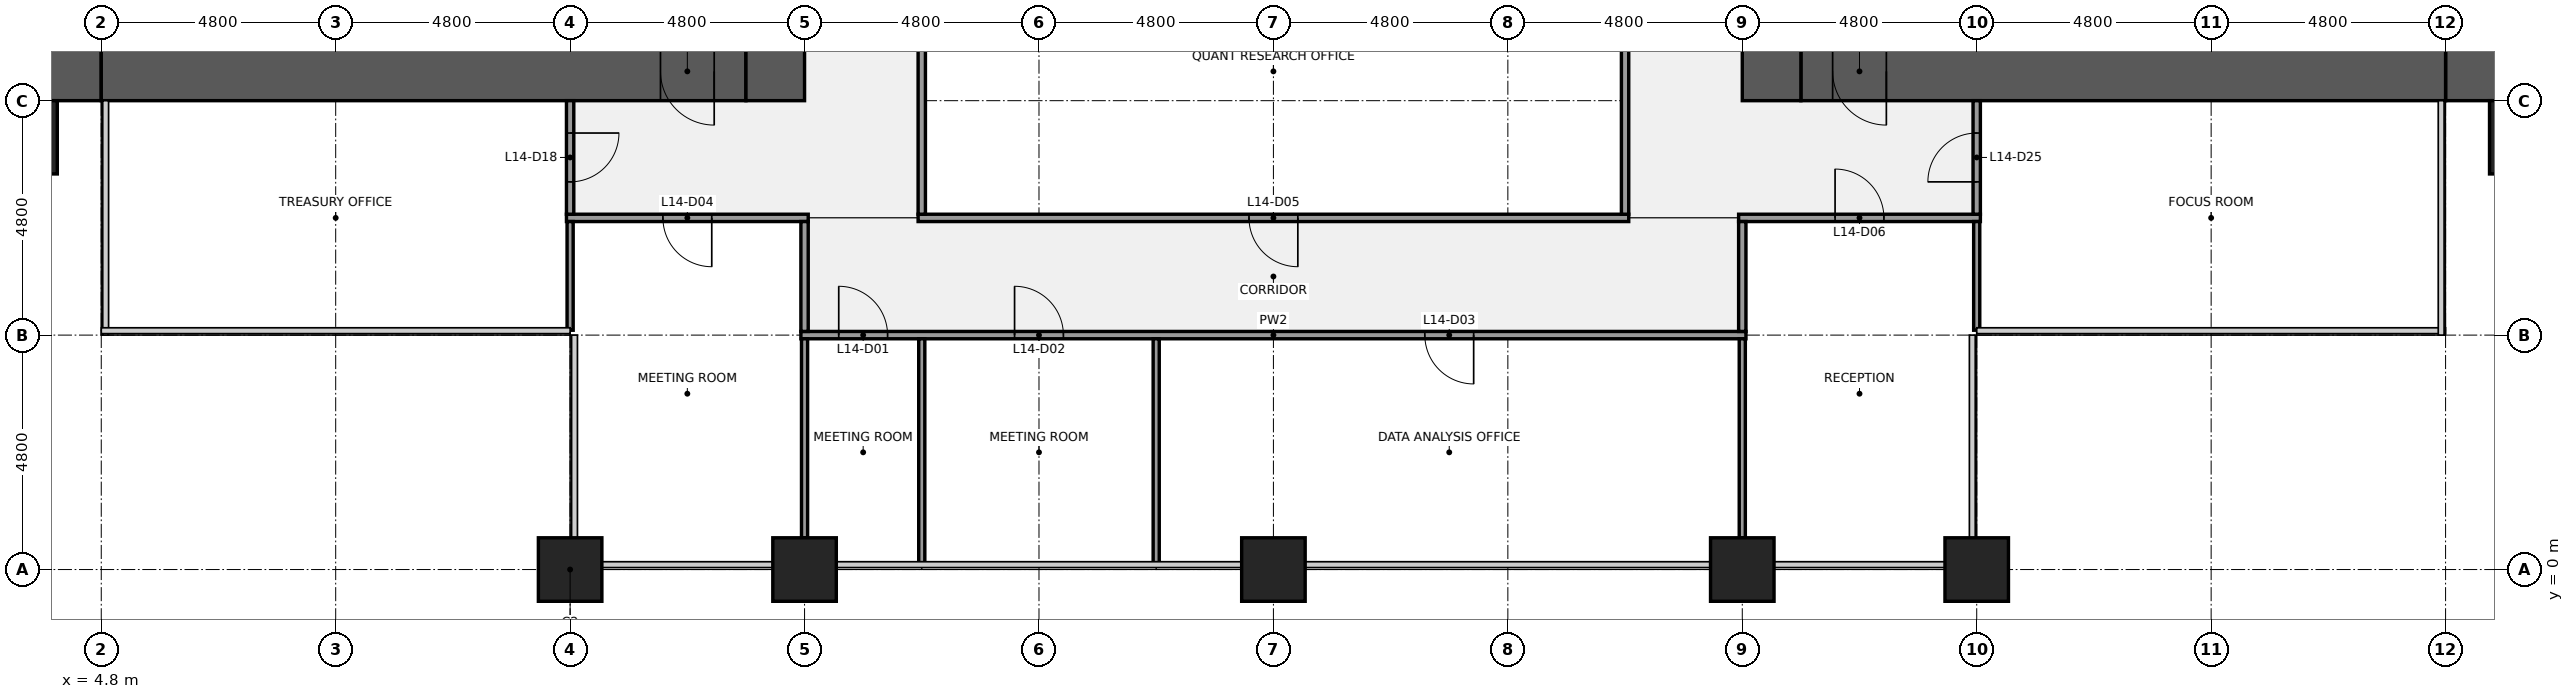
"""IFC4 building model, lengths in metres.
Left out: names, types, materials, properties, quantities, classifications, styles, units other than length and angle.
Written with IfcOpenShell. Run it as: python <this file> out.ifc"""

import sys

from ifc_helpers import new_model, si_unit, direction, frame, frame_2d, origin, origin_2d, place, context, subcontext, project, spatial, rectangle, extrude, element, fill, save


model = new_model("IFC4")
c1 = context("Model", 3, precision=1e-05, world=origin(), true_north=direction((0.0, 1.0)))
c2 = subcontext(c1, "Body", "Model", "MODEL_VIEW")
j1 = project(units=[si_unit("LENGTHUNIT", "METRE"), si_unit("PLANEANGLEUNIT", "RADIAN")], contexts=[c1])
p1 = place(None, origin())
s1 = spatial("IfcSite", under=j1, at=p1, CompositionType="ELEMENT")
p2 = place(p1, origin())
s2 = spatial("IfcBuilding", under=s1, at=p2, CompositionType="ELEMENT")
p3 = place(p2, frame((0.0, 0.0, 67.0)))
s3 = spatial("IfcBuildingStorey", under=s2, at=p3, CompositionType="ELEMENT", Elevation=67.0)
for number, where, z_axis, x_axis in (
    (1, (14.4, 0.0, 0.0), (0.0, 0.0, 1.0), (1.0, 0.0, 0.0)),
    (2, (19.2, 0.0, 0.0), (0.0, 0.0, 1.0), (1.0, 0.0, 0.0)),
    (3, (28.8, 0.0, 0.0), (0.0, 0.0, 1.0), (1.0, 0.0, 0.0)),
    (4, (38.4, 0.0, 0.0), (0.0, 0.0, 1.0), (1.0, 0.0, 0.0)),
    (5, (43.2, 0.0, 0.0), (0.0, 0.0, 1.0), (1.0, 0.0, 0.0)),
):
    element("IfcColumn", number, at=place(p3, frame(where, z_axis=z_axis, x_axis=x_axis)), inside=s3, PredefinedType="COLUMN", context=c2, shape_type="SweptSolid", body=[
        extrude(rectangle(XDim=1.3, YDim=1.3, at=origin_2d()), origin(), (0.0, 0.0, 1.0), 4.0),
    ])
p4 = place(p3, frame((4.8, 10.2, 0.0), z_axis=(0.0, 0.0, 1.0), x_axis=(-1.0, 0.0, 0.0)))
e6 = element("IfcWall", 6, at=p4, inside=s3, PredefinedType="SHEAR", context=c2, shape_type="SweptSolid", body=[
    extrude(rectangle(XDim=3.6, YDim=1.2, at=frame_2d((1.8, 0.0))), origin(), (0.0, 0.0, 1.0), 3.84),
])
p5 = place(p3, frame((18.0, 10.2, 0.0), z_axis=(0.0, 0.0, 1.0), x_axis=(-1.0, 0.0, 0.0)))
e7 = element("IfcWall", 7, at=p5, inside=s3, PredefinedType="SHEAR", context=c2, shape_type="SweptSolid", body=[
    extrude(rectangle(XDim=13.2, YDim=1.2, at=frame_2d((6.6, 0.0))), origin(), (0.0, 0.0, 1.0), 3.84),
])
p6 = place(p5, frame((0.65, 0.0, 0.0)))
e8 = element("IfcOpeningElement", 8, at=p6, cuts=e7, PredefinedType="OPENING", context=c2, shape_type="SweptSolid", body=[
    extrude(rectangle(XDim=1.1, YDim=2.1, at=frame_2d((0.55, 1.05))), frame((0.0, 0.61, 0.0), z_axis=(0.0, -1.0, 0.0), x_axis=(1.0, 0.0, 0.0)), (0.0, 0.0, 1.0), 1.22),
])
p7 = place(p3, frame((18.6, 38.4, 0.0), z_axis=(0.0, 0.0, 1.0), x_axis=(0.0, -1.0, 0.0)))
e9 = element("IfcWall", 9, at=p7, inside=s3, PredefinedType="SHEAR", context=c2, shape_type="SweptSolid", body=[
    extrude(rectangle(XDim=28.8, YDim=1.2, at=frame_2d((14.4, 0.0))), origin(), (0.0, 0.0, 1.0), 3.84),
])
p8 = place(p7, frame((18.3, 0.0, 0.0)))
e10 = element("IfcOpeningElement", 10, at=p8, cuts=e9, PredefinedType="OPENING", context=c2, shape_type="SweptSolid", body=[
    extrude(rectangle(XDim=1.8, YDim=2.1, at=frame_2d((0.9, 1.05))), frame((0.0, 0.61, 0.0), z_axis=(0.0, -1.0, 0.0), x_axis=(1.0, 0.0, 0.0)), (0.0, 0.0, 1.0), 1.22),
])
p9 = place(p7, frame((8.7, 0.0, 0.0)))
e11 = element("IfcOpeningElement", 11, at=p9, cuts=e9, PredefinedType="OPENING", context=c2, shape_type="SweptSolid", body=[
    extrude(rectangle(XDim=1.8, YDim=2.1, at=frame_2d((0.9, 1.05))), frame((0.0, 0.61, 0.0), z_axis=(0.0, -1.0, 0.0), x_axis=(1.0, 0.0, 0.0)), (0.0, 0.0, 1.0), 1.22),
])
p10 = place(p3, frame((56.4, 10.2, 0.0), z_axis=(0.0, 0.0, 1.0), x_axis=(-1.0, 0.0, 0.0)))
e12 = element("IfcWall", 12, at=p10, inside=s3, PredefinedType="SHEAR", context=c2, shape_type="SweptSolid", body=[
    extrude(rectangle(XDim=3.6, YDim=1.2, at=frame_2d((1.8, 0.0))), origin(), (0.0, 0.0, 1.0), 3.84),
])
p11 = place(p3, frame((52.8, 10.2, 0.0), z_axis=(0.0, 0.0, 1.0), x_axis=(-1.0, 0.0, 0.0)))
e13 = element("IfcWall", 13, at=p11, inside=s3, PredefinedType="SHEAR", context=c2, shape_type="SweptSolid", body=[
    extrude(rectangle(XDim=13.2, YDim=1.2, at=frame_2d((6.6, 0.0))), origin(), (0.0, 0.0, 1.0), 3.84),
])
p12 = place(p11, frame((11.45, 0.0, 0.0)))
e14 = element("IfcOpeningElement", 14, at=p12, cuts=e13, PredefinedType="OPENING", context=c2, shape_type="SweptSolid", body=[
    extrude(rectangle(XDim=1.1, YDim=2.1, at=frame_2d((0.55, 1.05))), frame((0.0, 0.61, 0.0), z_axis=(0.0, -1.0, 0.0), x_axis=(1.0, 0.0, 0.0)), (0.0, 0.0, 1.0), 1.22),
])
p13 = place(p3, frame((39.0, 9.6, 0.0), z_axis=(0.0, 0.0, 1.0), x_axis=(0.0, 1.0, 0.0)))
e15 = element("IfcWall", 15, at=p13, inside=s3, PredefinedType="SHEAR", context=c2, shape_type="SweptSolid", body=[
    extrude(rectangle(XDim=28.8, YDim=1.2, at=frame_2d((14.4, 0.0))), origin(), (0.0, 0.0, 1.0), 3.84),
])
p14 = place(p13, frame((8.7, 0.0, 0.0)))
e16 = element("IfcOpeningElement", 16, at=p14, cuts=e15, PredefinedType="OPENING", context=c2, shape_type="SweptSolid", body=[
    extrude(rectangle(XDim=1.8, YDim=2.1, at=frame_2d((0.9, 1.05))), frame((0.0, 0.61, 0.0), z_axis=(0.0, -1.0, 0.0), x_axis=(1.0, 0.0, 0.0)), (0.0, 0.0, 1.0), 1.22),
])
p15 = place(p13, frame((18.3, 0.0, 0.0)))
e17 = element("IfcOpeningElement", 17, at=p15, cuts=e15, PredefinedType="OPENING", context=c2, shape_type="SweptSolid", body=[
    extrude(rectangle(XDim=1.8, YDim=2.1, at=frame_2d((0.9, 1.05))), frame((0.0, 0.61, 0.0), z_axis=(0.0, -1.0, 0.0), x_axis=(1.0, 0.0, 0.0)), (0.0, 0.0, 1.0), 1.22),
])
p16 = place(p3, frame((19.125, 4.8, 0.0), z_axis=(0.0, 0.0, 1.0), x_axis=(1.0, 0.0, 0.0)))
e18 = element("IfcWall", 18, at=p16, inside=s3, PredefinedType="PARTITIONING", context=c2, shape_type="SweptSolid", body=[
    extrude(rectangle(XDim=19.35, YDim=0.15, at=frame_2d((9.675, 0.0))), origin(), (0.0, 0.0, 1.0), 2.849),
])
p17 = place(p16, frame((0.775, 0.0, 0.0)))
e19 = element("IfcOpeningElement", 19, at=p17, cuts=e18, PredefinedType="OPENING", context=c2, shape_type="SweptSolid", body=[
    extrude(rectangle(XDim=1.0, YDim=2.1, at=frame_2d((0.5, 1.05))), frame((0.0, 0.085, 0.0), z_axis=(0.0, -1.0, 0.0), x_axis=(1.0, 0.0, 0.0)), (0.0, 0.0, 1.0), 0.17),
])
p18 = place(p16, frame((4.375, 0.0, 0.0)))
e20 = element("IfcOpeningElement", 20, at=p18, cuts=e18, PredefinedType="OPENING", context=c2, shape_type="SweptSolid", body=[
    extrude(rectangle(XDim=1.0, YDim=2.1, at=frame_2d((0.5, 1.05))), frame((0.0, 0.085, 0.0), z_axis=(0.0, -1.0, 0.0), x_axis=(1.0, 0.0, 0.0)), (0.0, 0.0, 1.0), 0.17),
])
p19 = place(p16, frame((12.775, 0.0, 0.0)))
e21 = element("IfcOpeningElement", 21, at=p19, cuts=e18, PredefinedType="OPENING", context=c2, shape_type="SweptSolid", body=[
    extrude(rectangle(XDim=1.0, YDim=2.1, at=frame_2d((0.5, 1.05))), frame((0.0, 0.085, 0.0), z_axis=(0.0, -1.0, 0.0), x_axis=(1.0, 0.0, 0.0)), (0.0, 0.0, 1.0), 0.17),
])
p20 = place(p3, frame((14.325, 7.2, 0.0), z_axis=(0.0, 0.0, 1.0), x_axis=(1.0, 0.0, 0.0)))
e22 = element("IfcWall", 22, at=p20, inside=s3, PredefinedType="PARTITIONING", context=c2, shape_type="SweptSolid", body=[
    extrude(rectangle(XDim=4.95, YDim=0.15, at=frame_2d((2.475, 0.0))), origin(), (0.0, 0.0, 1.0), 2.849),
])
p21 = place(p20, frame((1.975, 0.0, 0.0)))
e23 = element("IfcOpeningElement", 23, at=p21, cuts=e22, PredefinedType="OPENING", context=c2, shape_type="SweptSolid", body=[
    extrude(rectangle(XDim=1.0, YDim=2.1, at=frame_2d((0.5, 1.05))), frame((0.0, 0.085, 0.0), z_axis=(0.0, -1.0, 0.0), x_axis=(1.0, 0.0, 0.0)), (0.0, 0.0, 1.0), 0.17),
])
p22 = place(p3, frame((21.525, 7.2, 0.0), z_axis=(0.0, 0.0, 1.0), x_axis=(1.0, 0.0, 0.0)))
e24 = element("IfcWall", 24, at=p22, inside=s3, PredefinedType="PARTITIONING", context=c2, shape_type="SweptSolid", body=[
    extrude(rectangle(XDim=14.55, YDim=0.15, at=frame_2d((7.275, 0.0))), origin(), (0.0, 0.0, 1.0), 2.849),
])
p23 = place(p22, frame((6.775, 0.0, 0.0)))
e25 = element("IfcOpeningElement", 25, at=p23, cuts=e24, PredefinedType="OPENING", context=c2, shape_type="SweptSolid", body=[
    extrude(rectangle(XDim=1.0, YDim=2.1, at=frame_2d((0.5, 1.05))), frame((0.0, 0.085, 0.0), z_axis=(0.0, -1.0, 0.0), x_axis=(1.0, 0.0, 0.0)), (0.0, 0.0, 1.0), 0.17),
])
p24 = place(p3, frame((38.325, 7.2, 0.0), z_axis=(0.0, 0.0, 1.0), x_axis=(1.0, 0.0, 0.0)))
e26 = element("IfcWall", 26, at=p24, inside=s3, PredefinedType="PARTITIONING", context=c2, shape_type="SweptSolid", body=[
    extrude(rectangle(XDim=4.95, YDim=0.15, at=frame_2d((2.475, 0.0))), origin(), (0.0, 0.0, 1.0), 2.849),
])
p25 = place(p24, frame((1.975, 0.0, 0.0)))
e27 = element("IfcOpeningElement", 27, at=p25, cuts=e26, PredefinedType="OPENING", context=c2, shape_type="SweptSolid", body=[
    extrude(rectangle(XDim=1.0, YDim=2.1, at=frame_2d((0.5, 1.05))), frame((0.0, 0.085, 0.0), z_axis=(0.0, -1.0, 0.0), x_axis=(1.0, 0.0, 0.0)), (0.0, 0.0, 1.0), 0.17),
])
p26 = place(p3, frame((14.4, 4.9, 0.0), z_axis=(0.0, 0.0, 1.0), x_axis=(0.0, 1.0, 0.0)))
e28 = element("IfcWall", 28, at=p26, inside=s3, PredefinedType="PARTITIONING", context=c2, shape_type="SweptSolid", body=[
    extrude(rectangle(XDim=2.225, YDim=0.125, at=frame_2d((1.113, 0.0))), origin(), (0.0, 0.0, 1.0), 2.849),
])
p27 = place(p3, frame((14.4, 7.275, 0.0), z_axis=(0.0, 0.0, 1.0), x_axis=(0.0, 1.0, 0.0)))
e29 = element("IfcWall", 29, at=p27, inside=s3, PredefinedType="PARTITIONING", context=c2, shape_type="SweptSolid", body=[
    extrude(rectangle(XDim=2.325, YDim=0.15, at=frame_2d((1.163, 0.0))), origin(), (0.0, 0.0, 1.0), 2.849),
])
p28 = place(p27, frame((0.663, 0.0, 0.0)))
e30 = element("IfcOpeningElement", 30, at=p28, cuts=e29, PredefinedType="OPENING", context=c2, shape_type="SweptSolid", body=[
    extrude(rectangle(XDim=1.0, YDim=2.1, at=frame_2d((0.5, 1.05))), frame((0.0, 0.085, 0.0), z_axis=(0.0, -1.0, 0.0), x_axis=(1.0, 0.0, 0.0)), (0.0, 0.0, 1.0), 0.17),
])
p29 = place(p3, frame((19.2, 0.65, 0.0), z_axis=(0.0, 0.0, 1.0), x_axis=(0.0, 1.0, 0.0)))
e31 = element("IfcWall", 31, at=p29, inside=s3, PredefinedType="PARTITIONING", context=c2, shape_type="SweptSolid", body=[
    extrude(rectangle(XDim=4.075, YDim=0.125, at=frame_2d((2.038, 0.0))), origin(), (0.0, 0.0, 1.0), 2.849),
])
p30 = place(p3, frame((19.2, 4.875, 0.0), z_axis=(0.0, 0.0, 1.0), x_axis=(0.0, 1.0, 0.0)))
e32 = element("IfcWall", 32, at=p30, inside=s3, PredefinedType="PARTITIONING", context=c2, shape_type="SweptSolid", body=[
    extrude(rectangle(XDim=2.25, YDim=0.15, at=frame_2d((1.125, 0.0))), origin(), (0.0, 0.0, 1.0), 2.849),
])
p31 = place(p3, frame((21.6, 0.1, 0.0), z_axis=(0.0, 0.0, 1.0), x_axis=(0.0, 1.0, 0.0)))
e33 = element("IfcWall", 33, at=p31, inside=s3, PredefinedType="PARTITIONING", context=c2, shape_type="SweptSolid", body=[
    extrude(rectangle(XDim=4.625, YDim=0.125, at=frame_2d((2.312, 0.0))), origin(), (0.0, 0.0, 1.0), 2.849),
])
p32 = place(p3, frame((21.6, 7.275, 0.0), z_axis=(0.0, 0.0, 1.0), x_axis=(0.0, 1.0, 0.0)))
e34 = element("IfcWall", 34, at=p32, inside=s3, PredefinedType="PARTITIONING", context=c2, shape_type="SweptSolid", body=[
    extrude(rectangle(XDim=5.863, YDim=0.15, at=frame_2d((2.931, 0.0))), origin(), (0.0, 0.0, 1.0), 2.849),
])
p33 = place(p3, frame((26.4, 0.1, 0.0), z_axis=(0.0, 0.0, 1.0), x_axis=(0.0, 1.0, 0.0)))
e35 = element("IfcWall", 35, at=p33, inside=s3, PredefinedType="PARTITIONING", context=c2, shape_type="SweptSolid", body=[
    extrude(rectangle(XDim=4.625, YDim=0.125, at=frame_2d((2.312, 0.0))), origin(), (0.0, 0.0, 1.0), 2.849),
])
p34 = place(p3, frame((36.0, 7.275, 0.0), z_axis=(0.0, 0.0, 1.0), x_axis=(0.0, 1.0, 0.0)))
e36 = element("IfcWall", 36, at=p34, inside=s3, PredefinedType="PARTITIONING", context=c2, shape_type="SweptSolid", body=[
    extrude(rectangle(XDim=5.863, YDim=0.15, at=frame_2d((2.931, 0.0))), origin(), (0.0, 0.0, 1.0), 2.849),
])
p35 = place(p3, frame((38.4, 0.65, 0.0), z_axis=(0.0, 0.0, 1.0), x_axis=(0.0, 1.0, 0.0)))
e37 = element("IfcWall", 37, at=p35, inside=s3, PredefinedType="PARTITIONING", context=c2, shape_type="SweptSolid", body=[
    extrude(rectangle(XDim=4.075, YDim=0.125, at=frame_2d((2.038, 0.0))), origin(), (0.0, 0.0, 1.0), 2.849),
])
p36 = place(p3, frame((38.4, 4.875, 0.0), z_axis=(0.0, 0.0, 1.0), x_axis=(0.0, 1.0, 0.0)))
e38 = element("IfcWall", 38, at=p36, inside=s3, PredefinedType="PARTITIONING", context=c2, shape_type="SweptSolid", body=[
    extrude(rectangle(XDim=2.25, YDim=0.15, at=frame_2d((1.125, 0.0))), origin(), (0.0, 0.0, 1.0), 2.849),
])
p37 = place(p3, frame((43.2, 4.9, 0.0), z_axis=(0.0, 0.0, 1.0), x_axis=(0.0, 1.0, 0.0)))
e39 = element("IfcWall", 39, at=p37, inside=s3, PredefinedType="PARTITIONING", context=c2, shape_type="SweptSolid", body=[
    extrude(rectangle(XDim=2.225, YDim=0.125, at=frame_2d((1.113, 0.0))), origin(), (0.0, 0.0, 1.0), 2.849),
])
p38 = place(p3, frame((43.2, 7.275, 0.0), z_axis=(0.0, 0.0, 1.0), x_axis=(0.0, 1.0, 0.0)))
e40 = element("IfcWall", 40, at=p38, inside=s3, PredefinedType="PARTITIONING", context=c2, shape_type="SweptSolid", body=[
    extrude(rectangle(XDim=2.325, YDim=0.15, at=frame_2d((1.163, 0.0))), origin(), (0.0, 0.0, 1.0), 2.849),
])
p39 = place(p38, frame((0.663, 0.0, 0.0)))
e41 = element("IfcOpeningElement", 41, at=p39, cuts=e40, PredefinedType="OPENING", context=c2, shape_type="SweptSolid", body=[
    extrude(rectangle(XDim=1.0, YDim=2.1, at=frame_2d((0.5, 1.05))), frame((0.0, 0.085, 0.0), z_axis=(0.0, -1.0, 0.0), x_axis=(1.0, 0.0, 0.0)), (0.0, 0.0, 1.0), 0.17),
])
for number, where, z_axis, x_axis in (
    (42, (55.2, 8.85, 0.0), (0.0, 0.0, 1.0), (1.0, 0.0, 0.0)),
    (43, (2.4, 8.85, 0.0), (0.0, 0.0, 1.0), (1.0, 0.0, 0.0)),
):
    element("IfcColumn", number, at=place(p3, frame(where, z_axis=z_axis, x_axis=x_axis)), inside=s3, PredefinedType="PILASTER", context=c2, shape_type="SweptSolid", body=[
        extrude(rectangle(XDim=3.0, YDim=1.5, at=origin_2d()), origin(), (0.0, 0.0, 1.0), 4.0),
    ])
for number, where, z_axis, x_axis in (
    (44, (14.4, -1.075, 0.0), (0.0, 0.0, 1.0), (1.0, 0.0, 0.0)),
    (45, (19.2, -1.075, 0.0), (0.0, 0.0, 1.0), (1.0, 0.0, 0.0)),
    (46, (38.4, -1.075, 0.0), (0.0, 0.0, 1.0), (1.0, 0.0, 0.0)),
    (47, (43.2, -1.075, 0.0), (0.0, 0.0, 1.0), (1.0, 0.0, 0.0)),
):
    element("IfcColumn", number, at=place(p3, frame(where, z_axis=z_axis, x_axis=x_axis)), inside=s3, PredefinedType="PILASTER", context=c2, shape_type="SweptSolid", body=[
        extrude(rectangle(XDim=4.2, YDim=0.85, at=origin_2d()), origin(), (0.0, 0.0, 1.0), 4.0),
    ])
p40 = place(p6, origin())
e48 = element("IfcDoor", 48, at=p40, inside=s3, OperationType="SINGLE_SWING_LEFT", PredefinedType="DOOR", context=c2, shape_type="SweptSolid", body=[
    extrude(rectangle(XDim=1.1, YDim=2.1, at=frame_2d((0.55, 1.05))), frame((0.0, 0.025, 0.0), z_axis=(0.0, -1.0, 0.0), x_axis=(1.0, 0.0, 0.0)), (0.0, 0.0, 1.0), 0.05),
])
fill(e8, e48)
p41 = place(p12, origin())
e49 = element("IfcDoor", 49, at=p41, inside=s3, OperationType="SINGLE_SWING_LEFT", PredefinedType="DOOR", context=c2, shape_type="SweptSolid", body=[
    extrude(rectangle(XDim=1.1, YDim=2.1, at=frame_2d((0.55, 1.05))), frame((0.0, 0.025, 0.0), z_axis=(0.0, -1.0, 0.0), x_axis=(1.0, 0.0, 0.0)), (0.0, 0.0, 1.0), 0.05),
])
fill(e14, e49)
p42 = place(p17, origin())
e50 = element("IfcDoor", 50, at=p42, inside=s3, OperationType="SINGLE_SWING_LEFT", PredefinedType="DOOR", context=c2, shape_type="SweptSolid", body=[
    extrude(rectangle(XDim=1.0, YDim=2.1, at=frame_2d((0.5, 1.05))), frame((0.0, 0.025, 0.0), z_axis=(0.0, -1.0, 0.0), x_axis=(1.0, 0.0, 0.0)), (0.0, 0.0, 1.0), 0.05),
])
fill(e19, e50)
p43 = place(p18, origin())
e51 = element("IfcDoor", 51, at=p43, inside=s3, OperationType="SINGLE_SWING_LEFT", PredefinedType="DOOR", context=c2, shape_type="SweptSolid", body=[
    extrude(rectangle(XDim=1.0, YDim=2.1, at=frame_2d((0.5, 1.05))), frame((0.0, 0.025, 0.0), z_axis=(0.0, -1.0, 0.0), x_axis=(1.0, 0.0, 0.0)), (0.0, 0.0, 1.0), 0.05),
])
fill(e20, e51)
p44 = place(p19, origin())
e52 = element("IfcDoor", 52, at=p44, inside=s3, OperationType="SINGLE_SWING_RIGHT", PredefinedType="DOOR", context=c2, shape_type="SweptSolid", body=[
    extrude(rectangle(XDim=1.0, YDim=2.1, at=frame_2d((0.5, 1.05))), frame((0.0, 0.025, 0.0), z_axis=(0.0, -1.0, 0.0), x_axis=(1.0, 0.0, 0.0)), (0.0, 0.0, 1.0), 0.05),
])
fill(e21, e52)
p45 = place(p21, origin())
e53 = element("IfcDoor", 53, at=p45, inside=s3, OperationType="SINGLE_SWING_RIGHT", PredefinedType="DOOR", context=c2, shape_type="SweptSolid", body=[
    extrude(rectangle(XDim=1.0, YDim=2.1, at=frame_2d((0.5, 1.05))), frame((0.0, 0.025, 0.0), z_axis=(0.0, -1.0, 0.0), x_axis=(1.0, 0.0, 0.0)), (0.0, 0.0, 1.0), 0.05),
])
fill(e23, e53)
p46 = place(p23, origin())
e54 = element("IfcDoor", 54, at=p46, inside=s3, OperationType="SINGLE_SWING_RIGHT", PredefinedType="DOOR", context=c2, shape_type="SweptSolid", body=[
    extrude(rectangle(XDim=1.0, YDim=2.1, at=frame_2d((0.5, 1.05))), frame((0.0, 0.025, 0.0), z_axis=(0.0, -1.0, 0.0), x_axis=(1.0, 0.0, 0.0)), (0.0, 0.0, 1.0), 0.05),
])
fill(e25, e54)
p47 = place(p25, origin())
e55 = element("IfcDoor", 55, at=p47, inside=s3, OperationType="SINGLE_SWING_LEFT", PredefinedType="DOOR", context=c2, shape_type="SweptSolid", body=[
    extrude(rectangle(XDim=1.0, YDim=2.1, at=frame_2d((0.5, 1.05))), frame((0.0, 0.025, 0.0), z_axis=(0.0, -1.0, 0.0), x_axis=(1.0, 0.0, 0.0)), (0.0, 0.0, 1.0), 0.05),
])
fill(e27, e55)
p48 = place(p28, origin())
e56 = element("IfcDoor", 56, at=p48, inside=s3, OperationType="SINGLE_SWING_RIGHT", PredefinedType="DOOR", context=c2, shape_type="SweptSolid", body=[
    extrude(rectangle(XDim=1.0, YDim=2.1, at=frame_2d((0.5, 1.05))), frame((0.0, 0.025, 0.0), z_axis=(0.0, -1.0, 0.0), x_axis=(1.0, 0.0, 0.0)), (0.0, 0.0, 1.0), 0.05),
])
fill(e30, e56)
p49 = place(p39, origin())
e57 = element("IfcDoor", 57, at=p49, inside=s3, OperationType="SINGLE_SWING_LEFT", PredefinedType="DOOR", context=c2, shape_type="SweptSolid", body=[
    extrude(rectangle(XDim=1.0, YDim=2.1, at=frame_2d((0.5, 1.05))), frame((0.0, 0.025, 0.0), z_axis=(0.0, -1.0, 0.0), x_axis=(1.0, 0.0, 0.0)), (0.0, 0.0, 1.0), 0.05),
])
fill(e41, e57)
save(model, sys.argv[1])
